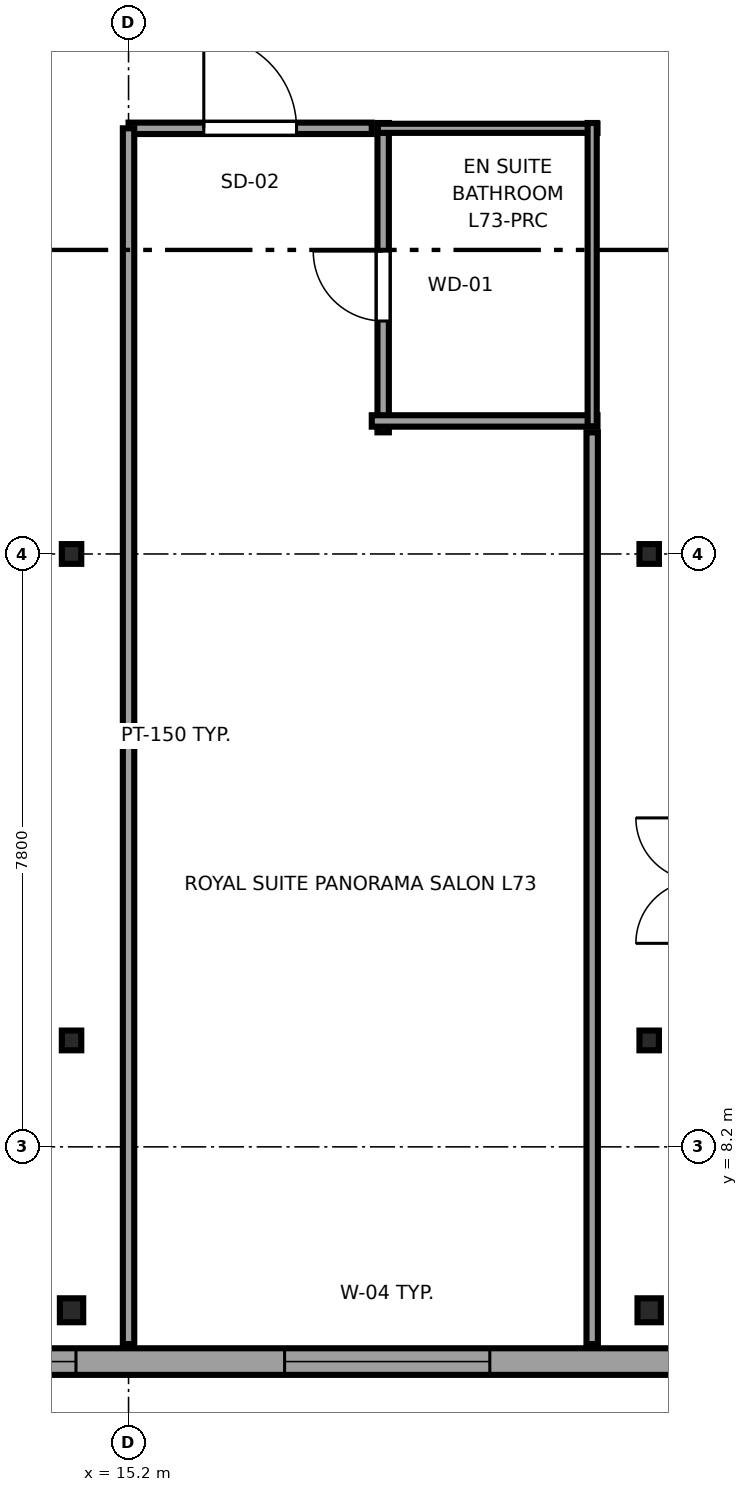
"""IFC4 building model, lengths in metres.
Left out: names, types, materials, properties, quantities, classifications, styles, units other than length and angle.
Written with IfcOpenShell. Run it as: python <this file> out.ifc"""

import sys

from ifc_helpers import new_model, si_unit, direction, frame, frame_2d, origin, origin_2d, place, context, subcontext, project, spatial, rectangle, i_section, extrude, source, transform, mapped, element, fill, save


model = new_model("IFC4")
c1 = context("Model", 3, precision=1e-05, world=origin(), true_north=direction((0.0, 1.0)))
c2 = subcontext(c1, "Body", "Model", "MODEL_VIEW")
j1 = project(units=[si_unit("LENGTHUNIT", "METRE"), si_unit("PLANEANGLEUNIT", "RADIAN")], contexts=[c1])
p1 = place(None, origin())
s1 = spatial("IfcSite", under=j1, at=p1, CompositionType="ELEMENT")
p2 = place(p1, origin())
s2 = spatial("IfcBuilding", under=s1, at=p2, CompositionType="ELEMENT")
p3 = place(p2, frame((0.0, 0.0, 275.05)))
s3 = spatial("IfcBuildingStorey", under=s2, at=p3, CompositionType="ELEMENT", Elevation=275.05)
m1 = source(origin(), c2, "Body", "SweptSolid", [
    extrude(i_section(OverallWidth=0.307, OverallDepth=0.315, WebThickness=0.012, FlangeThickness=0.019, FilletRadius=0.017, at=origin_2d()), origin(), (0.0, 0.0, 1.0), 3.55),
])
p4 = place(p3, frame((14.45, 6.05, 0.0), z_axis=(0.0, 0.0, 1.0), x_axis=(1.0, 0.0, 0.0)))
e1 = element("IfcColumn", 1, at=p4, inside=s3, PredefinedType="COLUMN", context=c2, shape_type="MappedRepresentation", body=[
    mapped(m1, transform((0.0, 0.0, 0.0), x_axis=(1.0, 0.0, 0.0), y_axis=(0.0, 1.0, 0.0), z_axis=(0.0, 0.0, 1.0), scale=1.0)),
])
m2 = source(origin(), c2, "Body", "SweptSolid", [
    extrude(i_section(OverallWidth=0.256, OverallDepth=0.26, WebThickness=0.01, FlangeThickness=0.017, FilletRadius=0.014, at=origin_2d()), origin(), (0.0, 0.0, 1.0), 3.55),
])
for number, where, z_axis, x_axis in (
    (2, (14.45, 9.6, 0.0), (0.0, 0.0, 1.0), (1.0, 0.0, 0.0)),
    (3, (14.45, 16.0, 0.0), (0.0, 0.0, 1.0), (1.0, 0.0, 0.0)),
):
    element("IfcColumn", number, at=place(p3, frame(where, z_axis=z_axis, x_axis=x_axis)), inside=s3, PredefinedType="COLUMN", context=c2, shape_type="MappedRepresentation", body=[
        mapped(m2, transform((0.0, 0.0, 0.0), x_axis=(1.0, 0.0, 0.0), y_axis=(0.0, 1.0, 0.0), z_axis=(0.0, 0.0, 1.0), scale=1.0)),
    ])
p5 = place(p3, frame((22.05, 6.05, 0.0), z_axis=(0.0, 0.0, 1.0), x_axis=(1.0, 0.0, 0.0)))
e4 = element("IfcColumn", 4, at=p5, inside=s3, PredefinedType="COLUMN", context=c2, shape_type="MappedRepresentation", body=[
    mapped(m1, transform((0.0, 0.0, 0.0), x_axis=(1.0, 0.0, 0.0), y_axis=(0.0, 1.0, 0.0), z_axis=(0.0, 0.0, 1.0), scale=1.0)),
])
for number, where, z_axis, x_axis in (
    (5, (22.05, 9.6, 0.0), (0.0, 0.0, 1.0), (1.0, 0.0, 0.0)),
    (6, (22.05, 16.0, 0.0), (0.0, 0.0, 1.0), (1.0, 0.0, 0.0)),
):
    element("IfcColumn", number, at=place(p3, frame(where, z_axis=z_axis, x_axis=x_axis)), inside=s3, PredefinedType="COLUMN", context=c2, shape_type="MappedRepresentation", body=[
        mapped(m2, transform((0.0, 0.0, 0.0), x_axis=(1.0, 0.0, 0.0), y_axis=(0.0, 1.0, 0.0), z_axis=(0.0, 0.0, 1.0), scale=1.0)),
    ])
p6 = place(p3, frame((7.017, 5.375, 0.0), z_axis=(0.0, 0.0, 1.0), x_axis=(1.0, 0.0, 0.0)))
e7 = element("IfcWall", 7, at=p6, inside=s3, PredefinedType="SOLIDWALL", context=c2, shape_type="SweptSolid", body=[
    extrude(rectangle(XDim=27.566, YDim=0.35, at=frame_2d((13.783, 0.0))), origin(), (0.0, 0.0, 1.0), 3.33),
])
p7 = place(p6, frame((0.897, 0.0, 0.68)))
e8 = element("IfcOpeningElement", 8, at=p7, cuts=e7, PredefinedType="OPENING", context=c2, shape_type="SweptSolid", body=[
    extrude(rectangle(XDim=2.7, YDim=1.95, at=frame_2d((1.35, 0.975))), frame((0.0, 0.185, 0.0), z_axis=(0.0, -1.0, 0.0), x_axis=(1.0, 0.0, 0.0)), (0.0, 0.0, 1.0), 0.37),
])
p8 = place(p6, frame((4.791, 0.0, 0.68)))
e9 = element("IfcOpeningElement", 9, at=p8, cuts=e7, PredefinedType="OPENING", context=c2, shape_type="SweptSolid", body=[
    extrude(rectangle(XDim=2.7, YDim=1.95, at=frame_2d((1.35, 0.975))), frame((0.0, 0.185, 0.0), z_axis=(0.0, -1.0, 0.0), x_axis=(1.0, 0.0, 0.0)), (0.0, 0.0, 1.0), 0.37),
])
p9 = place(p6, frame((10.236, 0.0, 0.68)))
e10 = element("IfcOpeningElement", 10, at=p9, cuts=e7, PredefinedType="OPENING", context=c2, shape_type="SweptSolid", body=[
    extrude(rectangle(XDim=2.7, YDim=1.95, at=frame_2d((1.35, 0.975))), frame((0.0, 0.185, 0.0), z_axis=(0.0, -1.0, 0.0), x_axis=(1.0, 0.0, 0.0)), (0.0, 0.0, 1.0), 0.37),
])
p10 = place(p6, frame((22.368, 0.0, 0.68)))
e11 = element("IfcOpeningElement", 11, at=p10, cuts=e7, PredefinedType="OPENING", context=c2, shape_type="SweptSolid", body=[
    extrude(rectangle(XDim=2.7, YDim=1.95, at=frame_2d((1.35, 0.975))), frame((0.0, 0.185, 0.0), z_axis=(0.0, -1.0, 0.0), x_axis=(1.0, 0.0, 0.0)), (0.0, 0.0, 1.0), 0.37),
])
p11 = place(p3, frame((18.55, 17.6, 0.0), z_axis=(0.0, 0.0, 1.0), x_axis=(0.0, 1.0, 0.0)))
e12 = element("IfcWall", 12, at=p11, inside=s3, PredefinedType="PARTITIONING", context=c2, shape_type="SweptSolid", body=[
    extrude(rectangle(XDim=4.07, YDim=0.15, at=frame_2d((2.035, 0.0))), origin(), (0.0, 0.0, 1.0), 3.33),
])
p12 = place(p11, frame((1.465, 0.0, 0.0)))
e13 = element("IfcOpeningElement", 13, at=p12, cuts=e12, PredefinedType="OPENING", context=c2, shape_type="SweptSolid", body=[
    extrude(rectangle(XDim=0.92, YDim=2.01, at=frame_2d((0.46, 1.005))), frame((0.0, 0.085, 0.0), z_axis=(0.0, -1.0, 0.0), x_axis=(1.0, 0.0, 0.0)), (0.0, 0.0, 1.0), 0.17),
])
p13 = place(p3, frame((18.4, 17.75, 0.0), z_axis=(0.0, 0.0, 1.0), x_axis=(1.0, 0.0, 0.0)))
e14 = element("IfcWall", 14, at=p13, inside=s3, PredefinedType="PARTITIONING", context=c2, shape_type="SweptSolid", body=[
    extrude(rectangle(XDim=2.97, YDim=0.15, at=frame_2d((1.485, 0.0))), origin(), (0.0, 0.0, 1.0), 3.33),
])
p14 = place(p3, frame((18.48, 21.6, 0.0), z_axis=(0.0, 0.0, 1.0), x_axis=(1.0, 0.0, 0.0)))
e15 = element("IfcWall", 15, at=p14, inside=s3, PredefinedType="PLUMBINGWALL", context=c2, shape_type="SweptSolid", body=[
    extrude(rectangle(XDim=2.89, YDim=0.12, at=frame_2d((1.445, 0.0))), origin(), (0.0, 0.0, 1.0), 3.33),
])
p15 = place(p3, frame((21.3, 17.68, 0.0), z_axis=(0.0, 0.0, 1.0), x_axis=(0.0, 1.0, 0.0)))
e16 = element("IfcWall", 16, at=p15, inside=s3, PredefinedType="PLUMBINGWALL", context=c2, shape_type="SweptSolid", body=[
    extrude(rectangle(XDim=3.99, YDim=0.12, at=frame_2d((1.995, 0.0))), origin(), (0.0, 0.0, 1.0), 3.33),
])
p16 = place(p3, frame((15.2, 21.6, 0.0), z_axis=(0.0, 0.0, 1.0), x_axis=(1.0, 0.0, 0.0)))
e17 = element("IfcWall", 17, at=p16, inside=s3, PredefinedType="PARTITIONING", context=c2, shape_type="SweptSolid", body=[
    extrude(rectangle(XDim=3.2, YDim=0.15, at=frame_2d((1.6, 0.0))), origin(), (0.0, 0.0, 1.0), 3.33),
])
p17 = place(p16, frame((0.99, 0.0, 0.0)))
e18 = element("IfcOpeningElement", 18, at=p17, cuts=e17, PredefinedType="OPENING", context=c2, shape_type="SweptSolid", body=[
    extrude(rectangle(XDim=1.22, YDim=2.08, at=frame_2d((0.61, 1.04))), frame((0.0, 0.085, 0.0), z_axis=(0.0, -1.0, 0.0), x_axis=(1.0, 0.0, 0.0)), (0.0, 0.0, 1.0), 0.17),
])
p18 = place(p3, frame((21.3, 5.605, 0.0), z_axis=(0.0, 0.0, 1.0), x_axis=(0.0, 1.0, 0.0)))
e19 = element("IfcWall", 19, at=p18, inside=s3, PredefinedType="PARTITIONING", context=c2, shape_type="SweptSolid", body=[
    extrude(rectangle(XDim=11.995, YDim=0.15, at=frame_2d((5.998, 0.0))), origin(), (0.0, 0.0, 1.0), 3.33),
])
p19 = place(p3, frame((15.2, 5.605, 0.0), z_axis=(0.0, 0.0, 1.0), x_axis=(0.0, 1.0, 0.0)))
e20 = element("IfcWall", 20, at=p19, inside=s3, PredefinedType="PARTITIONING", context=c2, shape_type="SweptSolid", body=[
    extrude(rectangle(XDim=15.995, YDim=0.15, at=frame_2d((7.998, 0.0))), origin(), (0.0, 0.0, 1.0), 3.33),
])
m3 = source(origin(), c2, "Body", "SweptSolid", [
    extrude(rectangle(XDim=2.7, YDim=1.95, at=frame_2d((1.35, 0.975))), frame((0.0, 0.09, 0.0), z_axis=(0.0, -1.0, 0.0), x_axis=(1.0, 0.0, 0.0)), (0.0, 0.0, 1.0), 0.06),
])
p20 = place(p8, origin())
e21 = element("IfcWindow", 21, at=p20, inside=s3, PartitioningType="TRIPLE_PANEL_HORIZONTAL", PredefinedType="WINDOW", context=c2, shape_type="MappedRepresentation", body=[
    mapped(m3, transform((0.0, 0.0, 0.0), x_axis=(1.0, 0.0, 0.0), y_axis=(0.0, 1.0, 0.0), z_axis=(0.0, 0.0, 1.0), scale=1.0)),
])
fill(e9, e21)
p21 = place(p9, origin())
e22 = element("IfcWindow", 22, at=p21, inside=s3, PartitioningType="TRIPLE_PANEL_HORIZONTAL", PredefinedType="WINDOW", context=c2, shape_type="MappedRepresentation", body=[
    mapped(m3, transform((0.0, 0.0, 0.0), x_axis=(1.0, 0.0, 0.0), y_axis=(0.0, 1.0, 0.0), z_axis=(0.0, 0.0, 1.0), scale=1.0)),
])
fill(e10, e22)
m4 = source(origin(), c2, "Body", "SweptSolid", [
    extrude(rectangle(XDim=0.92, YDim=2.01, at=frame_2d((0.46, 1.005))), frame((0.0, 0.025, 0.0), z_axis=(0.0, -1.0, 0.0), x_axis=(1.0, 0.0, 0.0)), (0.0, 0.0, 1.0), 0.05),
])
p22 = place(p12, origin())
e23 = element("IfcDoor", 23, at=p22, inside=s3, OperationType="SINGLE_SWING_RIGHT", PredefinedType="DOOR", context=c2, shape_type="MappedRepresentation", body=[
    mapped(m4, transform((0.0, 0.0, 0.0), x_axis=(1.0, 0.0, 0.0), y_axis=(0.0, 1.0, 0.0), z_axis=(0.0, 0.0, 1.0), scale=1.0)),
])
fill(e13, e23)
m5 = source(origin(), c2, "Body", "SweptSolid", [
    extrude(rectangle(XDim=1.22, YDim=2.08, at=frame_2d((0.61, 1.04))), frame((0.0, 0.025, 0.0), z_axis=(0.0, -1.0, 0.0), x_axis=(1.0, 0.0, 0.0)), (0.0, 0.0, 1.0), 0.05),
])
p23 = place(p17, origin())
e24 = element("IfcDoor", 24, at=p23, inside=s3, OperationType="SINGLE_SWING_LEFT", PredefinedType="DOOR", context=c2, shape_type="MappedRepresentation", body=[
    mapped(m5, transform((0.0, 0.0, 0.0), x_axis=(1.0, 0.0, 0.0), y_axis=(0.0, 1.0, 0.0), z_axis=(0.0, 0.0, 1.0), scale=1.0)),
])
fill(e18, e24)
save(model, sys.argv[1])
